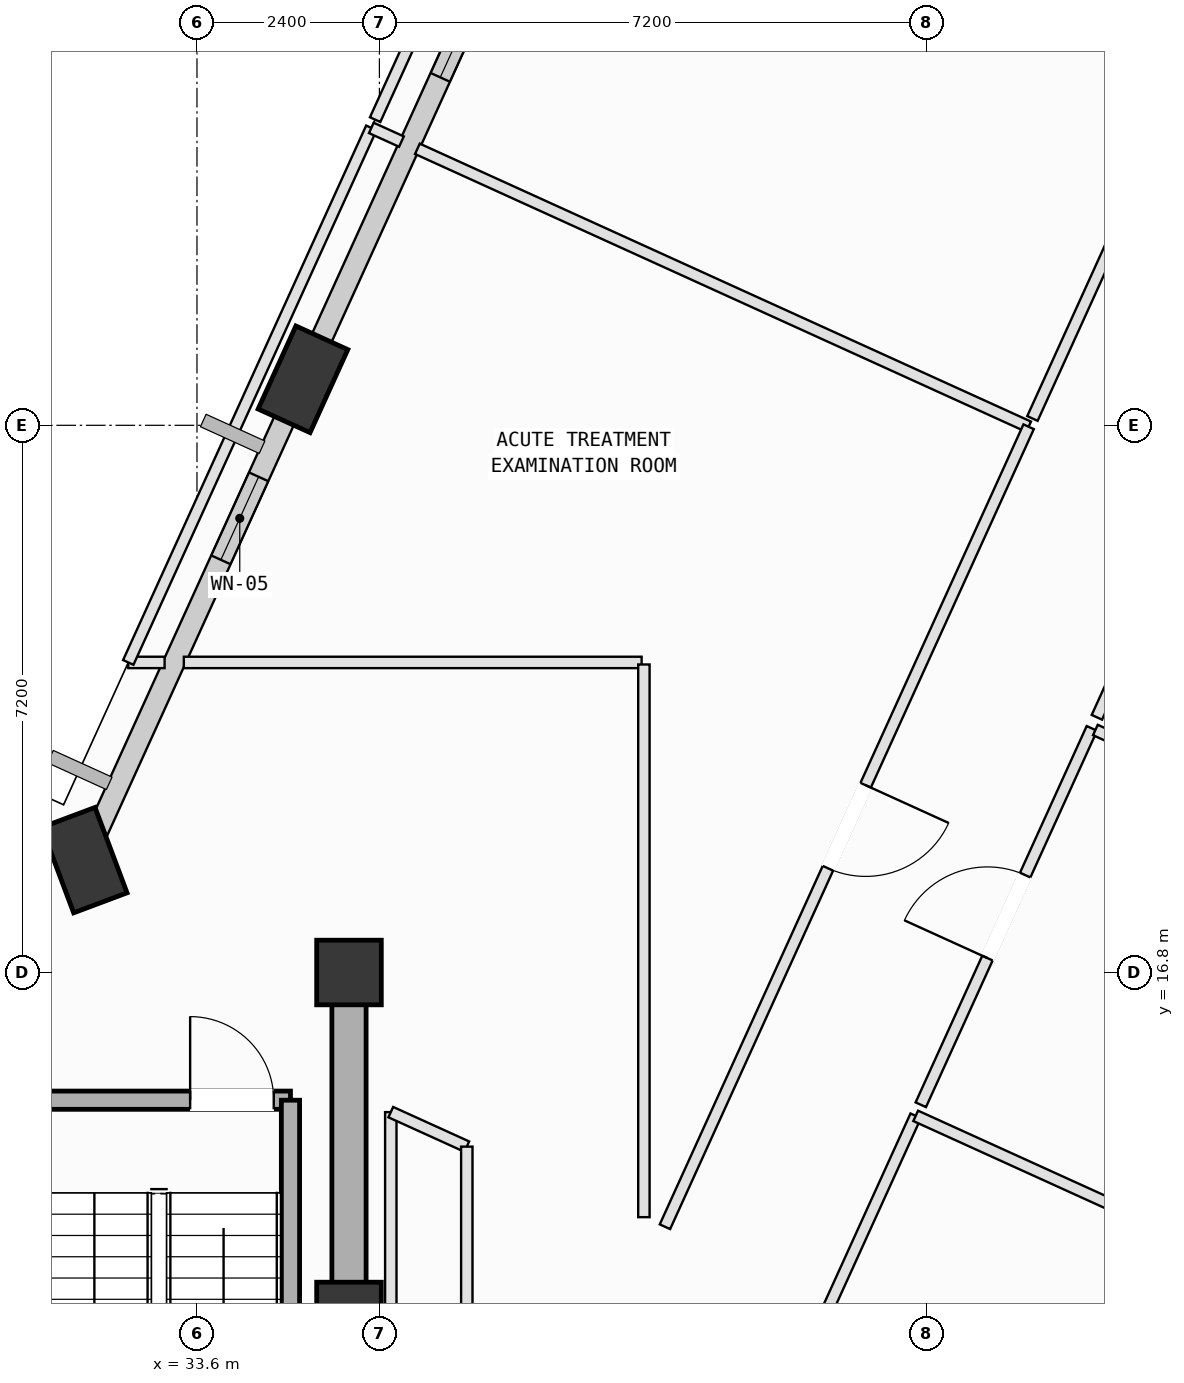
"""IFC4 building model, lengths in metres.
Left out: names, types, materials, properties, quantities, classifications, styles, units other than length and angle.
Written with IfcOpenShell. Run it as: python <this file> out.ifc"""

import sys

from ifc_helpers import new_model, si_unit, direction, frame, frame_2d, origin, origin_2d, place, context, subcontext, project, spatial, rectangle, extrude, element, fill, save


model = new_model("IFC4")
c1 = context("Model", 3, precision=1e-05, world=origin(), true_north=direction((0.0, 1.0)))
c2 = subcontext(c1, "Body", "Model", "MODEL_VIEW")
j1 = project(units=[si_unit("LENGTHUNIT", "METRE"), si_unit("PLANEANGLEUNIT", "RADIAN")], contexts=[c1])
p1 = place(None, origin())
s1 = spatial("IfcSite", under=j1, at=p1, CompositionType="ELEMENT")
p2 = place(p1, origin())
s2 = spatial("IfcBuilding", under=s1, at=p2, CompositionType="ELEMENT")
p3 = place(p2, frame((0.0, 0.0, 304.6)))
s3 = spatial("IfcBuildingStorey", under=s2, at=p3, CompositionType="ELEMENT", Elevation=304.6)
for number, where, z_axis, x_axis in (
    (1, (35.6, 12.3, 0.0), (0.0, 0.0, 1.0), (1.0, 0.0, 0.0)),
    (2, (35.6, 16.8, 0.0), (0.0, 0.0, 1.0), (1.0, 0.0, 0.0)),
):
    element("IfcColumn", number, at=place(p3, frame(where, z_axis=z_axis, x_axis=x_axis)), inside=s3, PredefinedType="COLUMN", context=c2, shape_type="SweptSolid", body=[
        extrude(rectangle(XDim=0.85, YDim=0.85, at=origin_2d()), origin(), (0.0, 0.0, 1.0), 4.0),
    ])
p4 = place(p3, frame((34.994, 24.605, 0.002), z_axis=(0.000795093642, 0.005749138642, 0.999983157474), x_axis=(-0.534703352063, -0.84502331988, 0.005283384443)))
e3 = element("IfcColumn", 3, at=p4, inside=s3, PredefinedType="COLUMN", context=c2, shape_type="SweptSolid", body=[
    extrude(rectangle(XDim=1.2, YDim=0.75, at=origin_2d()), origin(), (0.0, 0.0, 1.0), 3.992),
])
p5 = place(p3, frame((32.118, 18.279, 0.002), z_axis=(0.027064759156, -0.005891648252, 0.999616320041), x_axis=(-0.989252590347, -0.143898000097, 0.02593603784)))
e4 = element("IfcColumn", 4, at=p5, inside=s3, PredefinedType="COLUMN", context=c2, shape_type="SweptSolid", body=[
    extrude(rectangle(XDim=1.2, YDim=0.75, at=origin_2d()), origin(), (0.0, 0.0, 1.0), 3.978),
])
p6 = place(p3, frame((35.164, 24.977, 0.0), z_axis=(0.0, 0.0, 1.0), x_axis=(0.413860341101, 0.910340385825, 0.0)))
e5 = element("IfcWall", 5, at=p6, inside=s3, PredefinedType="SOLIDWALL", context=c2, shape_type="SweptSolid", body=[
    extrude(rectangle(XDim=6.409, YDim=0.28, at=frame_2d((3.205, 0.0))), origin(), (0.0, 0.0, 1.0), 3.265),
])
p7 = place(p6, frame((3.956, 0.0, 0.75)))
e6 = element("IfcOpeningElement", 6, at=p7, cuts=e5, PredefinedType="OPENING", context=c2, shape_type="SweptSolid", body=[
    extrude(rectangle(XDim=1.8, YDim=2.05, at=frame_2d((0.9, 1.025))), frame((0.0, 0.15, 0.0), z_axis=(0.0, -1.0, 0.0), x_axis=(1.0, 0.0, 0.0)), (0.0, 0.0, 1.0), 0.3),
])
p8 = place(p3, frame((32.286, 18.648, 0.0), z_axis=(0.0, 0.0, 1.0), x_axis=(0.413925403212, 0.910310804383, 0.0)))
e7 = element("IfcWall", 7, at=p8, inside=s3, PredefinedType="SOLIDWALL", context=c2, shape_type="SweptSolid", body=[
    extrude(rectangle(XDim=6.158, YDim=0.28, at=frame_2d((3.079, 0.0))), origin(), (0.0, 0.0, 1.0), 3.265),
])
p9 = place(p8, frame((3.935, 0.0, 0.75)))
e8 = element("IfcOpeningElement", 8, at=p9, cuts=e7, PredefinedType="OPENING", context=c2, shape_type="SweptSolid", body=[
    extrude(rectangle(XDim=1.2, YDim=1.75, at=frame_2d((0.6, 0.875))), frame((0.0, 0.15, 0.0), z_axis=(0.0, -1.0, 0.0), x_axis=(1.0, 0.0, 0.0)), (0.0, 0.0, 1.0), 0.3),
])
p10 = place(p3, frame((25.471, 21.301, 0.0), z_axis=(0.0, 0.0, 1.0), x_axis=(0.910323213303, -0.413898112247, 0.0)))
e9 = element("IfcWall", 9, at=p10, inside=s3, PredefinedType="SOLIDWALL", context=c2, shape_type="SweptSolid", body=[
    extrude(rectangle(XDim=6.958, YDim=0.28, at=frame_2d((3.479, 0.0))), origin(), (0.0, 0.0, 1.0), 2.765),
])
p11 = place(p3, frame((31.37, 15.12, 0.0), z_axis=(0.0, 0.0, 1.0), x_axis=(1.0, 0.0, 0.0)))
e10 = element("IfcWall", 10, at=p11, inside=s3, PredefinedType="SOLIDWALL", context=c2, shape_type="SweptSolid", body=[
    extrude(rectangle(XDim=3.46, YDim=0.24, at=frame_2d((1.73, 0.0))), origin(), (0.0, 0.0, 1.0), 3.78),
])
p12 = place(p11, frame((2.14, 0.0, 0.0)))
e11 = element("IfcOpeningElement", 11, at=p12, cuts=e10, PredefinedType="OPENING", context=c2, shape_type="SweptSolid", body=[
    extrude(rectangle(XDim=1.1, YDim=2.15, at=frame_2d((0.55, 1.075))), frame((0.0, 0.13, 0.0), z_axis=(0.0, -1.0, 0.0), x_axis=(1.0, 0.0, 0.0)), (0.0, 0.0, 1.0), 0.26),
])
p13 = place(p3, frame((34.83, 15.12, 0.0), z_axis=(0.0, 0.0, 1.0), x_axis=(0.0, -1.0, 0.0)))
e12 = element("IfcWall", 12, at=p13, inside=s3, PredefinedType="SOLIDWALL", context=c2, shape_type="SweptSolid", body=[
    extrude(rectangle(XDim=7.095, YDim=0.24, at=frame_2d((3.548, 0.0))), origin(), (0.0, 0.0, 1.0), 3.78),
])
p14 = place(p3, frame((35.6, 7.8, 0.0), z_axis=(0.0, 0.0, 1.0), x_axis=(0.0, 1.0, 0.0)))
e13 = element("IfcWall", 13, at=p14, inside=s3, PredefinedType="SHEAR", context=c2, shape_type="SweptSolid", body=[
    extrude(rectangle(XDim=9.0, YDim=0.45, at=frame_2d((4.5, 0.0))), origin(), (0.0, 0.0, 1.0), 3.78),
])
p15 = place(p3, frame((39.646, 7.413, 0.0), z_axis=(0.0, 0.0, 1.0), x_axis=(0.413840894574, 0.910349226384, 0.0)))
e14 = element("IfcWall", 14, at=p15, inside=s3, PredefinedType="PARTITIONING", context=c2, shape_type="SweptSolid", body=[
    extrude(rectangle(XDim=8.24, YDim=0.15, at=frame_2d((4.12, 0.0))), origin(), (0.0, 0.0, 1.0), 3.78),
])
p16 = place(p15, frame((3.52, 0.0, 0.0)))
e15 = element("IfcOpeningElement", 15, at=p16, cuts=e14, PredefinedType="OPENING", context=c2, shape_type="SweptSolid", body=[
    extrude(rectangle(XDim=1.2, YDim=2.15, at=frame_2d((0.6, 1.075))), frame((0.0, 0.085, 0.0), z_axis=(0.0, -1.0, 0.0), x_axis=(1.0, 0.0, 0.0)), (0.0, 0.0, 1.0), 0.17),
])
p17 = place(p3, frame((43.056, 14.914, 0.0), z_axis=(0.0, 0.0, 1.0), x_axis=(0.91037002219, -0.413795145813, 0.0)))
e16 = element("IfcWall", 16, at=p17, inside=s3, PredefinedType="PARTITIONING", context=c2, shape_type="SweptSolid", body=[
    extrude(rectangle(XDim=9.435, YDim=0.15, at=frame_2d((4.717, 0.0))), origin(), (0.0, 0.0, 1.0), 3.78),
])
p18 = place(p3, frame((43.123, 15.06, 0.0), z_axis=(0.0, 0.0, 1.0), x_axis=(0.413819852152, 0.910358791887, 0.0)))
e17 = element("IfcWall", 17, at=p18, inside=s3, PredefinedType="PARTITIONING", context=c2, shape_type="SweptSolid", body=[
    extrude(rectangle(XDim=5.439, YDim=0.15, at=frame_2d((2.72, 0.0))), origin(), (0.0, 0.0, 1.0), 3.78),
])
p19 = place(p18, frame((2.12, 0.0, 0.0)))
e18 = element("IfcOpeningElement", 18, at=p19, cuts=e17, PredefinedType="OPENING", context=c2, shape_type="SweptSolid", body=[
    extrude(rectangle(XDim=1.2, YDim=2.15, at=frame_2d((0.6, 1.075))), frame((0.0, 0.085, 0.0), z_axis=(0.0, -1.0, 0.0), x_axis=(1.0, 0.0, 0.0)), (0.0, 0.0, 1.0), 0.17),
])
p20 = place(p3, frame((45.42, 19.991, 0.0), z_axis=(0.0, 0.0, 1.0), x_axis=(0.910331727625, -0.413879385425, 0.0)))
e19 = element("IfcWall", 19, at=p20, inside=s3, PredefinedType="PARTITIONING", context=c2, shape_type="SweptSolid", body=[
    extrude(rectangle(XDim=9.385, YDim=0.15, at=frame_2d((4.692, 0.0))), origin(), (0.0, 0.0, 1.0), 3.78),
])
p21 = place(p3, frame((45.44, 20.158, 0.0), z_axis=(0.0, 0.0, 1.0), x_axis=(0.413963660089, 0.910293407713, 0.0)))
e20 = element("IfcWall", 20, at=p21, inside=s3, PredefinedType="PARTITIONING", context=c2, shape_type="SweptSolid", body=[
    extrude(rectangle(XDim=8.24, YDim=0.15, at=frame_2d((4.12, 0.0))), origin(), (0.0, 0.0, 1.0), 3.415),
])
p22 = place(p21, frame((3.52, 0.0, 0.0)))
e21 = element("IfcOpeningElement", 21, at=p22, cuts=e20, PredefinedType="OPENING", context=c2, shape_type="SweptSolid", body=[
    extrude(rectangle(XDim=1.2, YDim=2.15, at=frame_2d((0.6, 1.075))), frame((0.0, 0.085, 0.0), z_axis=(0.0, -1.0, 0.0), x_axis=(1.0, 0.0, 0.0)), (0.0, 0.0, 1.0), 0.17),
])
p23 = place(p3, frame((36.15, 7.5, 0.0), z_axis=(0.0, 0.0, 1.0), x_axis=(0.0, 1.0, 0.0)))
e22 = element("IfcWall", 22, at=p23, inside=s3, PredefinedType="PARTITIONING", context=c2, shape_type="SweptSolid", body=[
    extrude(rectangle(XDim=7.463, YDim=0.15, at=frame_2d((3.731, 0.0))), origin(), (0.0, 0.0, 1.0), 3.78),
])
p24 = place(p3, frame((36.15, 14.963, 0.0), z_axis=(0.0, 0.0, 1.0), x_axis=(0.910602348761, -0.413283634362, 0.0)))
e23 = element("IfcWall", 23, at=p24, inside=s3, PredefinedType="PARTITIONING", context=c2, shape_type="SweptSolid", body=[
    extrude(rectangle(XDim=1.098, YDim=0.15, at=frame_2d((0.549, 0.0))), origin(), (0.0, 0.0, 1.0), 3.78),
])
p25 = place(p3, frame((37.15, 14.509, 0.0), z_axis=(0.0, 0.0, 1.0), x_axis=(0.0, -1.0, 0.0)))
e24 = element("IfcWall", 24, at=p25, inside=s3, PredefinedType="PARTITIONING", context=c2, shape_type="SweptSolid", body=[
    extrude(rectangle(XDim=6.786, YDim=0.15, at=frame_2d((3.393, 0.0))), origin(), (0.0, 0.0, 1.0), 3.78),
])
p26 = place(p3, frame((39.45, 20.88, 0.0), z_axis=(0.0, 0.0, 1.0), x_axis=(-1.0, 0.0, 0.0)))
e25 = element("IfcWall", 25, at=p26, inside=s3, PredefinedType="PARTITIONING", context=c2, shape_type="SweptSolid", body=[
    extrude(rectangle(XDim=6.023, YDim=0.15, at=frame_2d((3.011, 0.0))), origin(), (0.0, 0.0, 1.0), 3.78),
])
p27 = place(p3, frame((33.174, 20.88, 0.0), z_axis=(0.0, 0.0, 1.0), x_axis=(-1.0, 0.0, 0.0)))
e26 = element("IfcWall", 26, at=p27, inside=s3, PredefinedType="PARTITIONING", context=c2, shape_type="SweptSolid", body=[
    extrude(rectangle(XDim=0.478, YDim=0.15, at=frame_2d((0.239, 0.0))), origin(), (0.0, 0.0, 1.0), 3.78),
])
p28 = place(p3, frame((32.696, 20.88, 0.0), z_axis=(0.0, 0.0, 1.0), x_axis=(0.413919598697, 0.910313443718, 0.0)))
e27 = element("IfcWall", 27, at=p28, inside=s3, PredefinedType="PARTITIONING", context=c2, shape_type="SweptSolid", body=[
    extrude(rectangle(XDim=7.726, YDim=0.15, at=frame_2d((3.863, 0.0))), origin(), (0.0, 0.0, 1.0), 3.78),
])
p29 = place(p3, frame((35.894, 27.913, 0.0), z_axis=(0.0, 0.0, 1.0), x_axis=(0.910212670279, -0.414141153308, 0.0)))
e28 = element("IfcWall", 28, at=p29, inside=s3, PredefinedType="PARTITIONING", context=c2, shape_type="SweptSolid", body=[
    extrude(rectangle(XDim=0.435, YDim=0.15, at=frame_2d((0.218, 0.0))), origin(), (0.0, 0.0, 1.0), 3.78),
])
p30 = place(p3, frame((36.5, 27.638, 0.0), z_axis=(0.0, 0.0, 1.0), x_axis=(0.910301163937, -0.413946603965, 0.0)))
e29 = element("IfcWall", 29, at=p30, inside=s3, PredefinedType="PARTITIONING", context=c2, shape_type="SweptSolid", body=[
    extrude(rectangle(XDim=8.834, YDim=0.15, at=frame_2d((4.417, 0.0))), origin(), (0.0, 0.0, 1.0), 3.78),
])
p31 = place(p3, frame((44.542, 23.981, 0.0), z_axis=(0.0, 0.0, 1.0), x_axis=(-0.413833170361, -0.910352737739, 0.0)))
e30 = element("IfcWall", 30, at=p31, inside=s3, PredefinedType="PARTITIONING", context=c2, shape_type="SweptSolid", body=[
    extrude(rectangle(XDim=11.562, YDim=0.15, at=frame_2d((5.781, 0.0))), origin(), (0.0, 0.0, 1.0), 3.78),
])
p32 = place(p31, frame((5.181, 0.0, 0.0)))
e31 = element("IfcOpeningElement", 31, at=p32, cuts=e30, PredefinedType="OPENING", context=c2, shape_type="SweptSolid", body=[
    extrude(rectangle(XDim=1.2, YDim=2.15, at=frame_2d((0.6, 1.075))), frame((0.0, 0.085, 0.0), z_axis=(0.0, -1.0, 0.0), x_axis=(1.0, 0.0, 0.0)), (0.0, 0.0, 1.0), 0.17),
])
p33 = place(p3, frame((39.48, 13.581, 0.0), z_axis=(0.0, 0.0, 1.0), x_axis=(0.0, 1.0, 0.0)))
e32 = element("IfcWall", 32, at=p33, inside=s3, PredefinedType="PARTITIONING", context=c2, shape_type="SweptSolid", body=[
    extrude(rectangle(XDim=7.272, YDim=0.15, at=frame_2d((3.636, 0.0))), origin(), (0.0, 0.0, 1.0), 3.78),
])
p34 = place(p3, frame((47.671, 30.862, 0.0), z_axis=(0.0, 0.0, 1.0), x_axis=(-0.41387959528, -0.910331632215, 0.0)))
e33 = element("IfcWall", 33, at=p34, inside=s3, PredefinedType="PARTITIONING", context=c2, shape_type="SweptSolid", body=[
    extrude(rectangle(XDim=7.439, YDim=0.15, at=frame_2d((3.719, 0.0))), origin(), (0.0, 0.0, 1.0), 3.78),
])
p35 = place(p34, frame((3.12, 0.0, 0.0)))
e34 = element("IfcOpeningElement", 34, at=p35, cuts=e33, PredefinedType="OPENING", context=c2, shape_type="SweptSolid", body=[
    extrude(rectangle(XDim=1.2, YDim=2.15, at=frame_2d((0.6, 1.075))), frame((0.0, 0.085, 0.0), z_axis=(0.0, -1.0, 0.0), x_axis=(1.0, 0.0, 0.0)), (0.0, 0.0, 1.0), 0.17),
])
p36 = place(p3, frame((35.944, 28.022, 0.0), z_axis=(0.0, 0.0, 1.0), x_axis=(0.41387959528, 0.910331632215, 0.0)))
e35 = element("IfcWall", 35, at=p36, inside=s3, PredefinedType="PARTITIONING", context=c2, shape_type="SweptSolid", body=[
    extrude(rectangle(XDim=7.439, YDim=0.15, at=frame_2d((3.719, 0.0))), origin(), (0.0, 0.0, 1.0), 3.265),
])
p37 = place(p7, origin())
e36 = element("IfcWindow", 36, at=p37, inside=s3, PartitioningType="SINGLE_PANEL", PredefinedType="WINDOW", context=c2, shape_type="SweptSolid", body=[
    extrude(rectangle(XDim=1.8, YDim=2.05, at=frame_2d((0.9, 1.025))), frame((0.0, 0.03, 0.0), z_axis=(0.0, -1.0, 0.0), x_axis=(1.0, 0.0, 0.0)), (0.0, 0.0, 1.0), 0.06),
])
fill(e6, e36)
p38 = place(p9, origin())
e37 = element("IfcWindow", 37, at=p38, inside=s3, PartitioningType="SINGLE_PANEL", PredefinedType="WINDOW", context=c2, shape_type="SweptSolid", body=[
    extrude(rectangle(XDim=1.2, YDim=1.75, at=frame_2d((0.6, 0.875))), frame((0.0, 0.03, 0.0), z_axis=(0.0, -1.0, 0.0), x_axis=(1.0, 0.0, 0.0)), (0.0, 0.0, 1.0), 0.06),
])
fill(e8, e37)
p39 = place(p12, origin())
e38 = element("IfcDoor", 38, at=p39, inside=s3, OperationType="SINGLE_SWING_LEFT", PredefinedType="DOOR", context=c2, shape_type="SweptSolid", body=[
    extrude(rectangle(XDim=1.1, YDim=2.15, at=frame_2d((0.55, 1.075))), frame((0.0, 0.025, 0.0), z_axis=(0.0, -1.0, 0.0), x_axis=(1.0, 0.0, 0.0)), (0.0, 0.0, 1.0), 0.05),
])
fill(e11, e38)
p40 = place(p19, origin())
e39 = element("IfcDoor", 39, at=p40, inside=s3, OperationType="SINGLE_SWING_LEFT", PredefinedType="DOOR", context=c2, shape_type="SweptSolid", body=[
    extrude(rectangle(XDim=1.2, YDim=2.15, at=frame_2d((0.6, 1.075))), frame((0.0, 0.025, 0.0), z_axis=(0.0, -1.0, 0.0), x_axis=(1.0, 0.0, 0.0)), (0.0, 0.0, 1.0), 0.05),
])
fill(e18, e39)
p41 = place(p32, origin())
e40 = element("IfcDoor", 40, at=p41, inside=s3, OperationType="SINGLE_SWING_LEFT", PredefinedType="DOOR", context=c2, shape_type="SweptSolid", body=[
    extrude(rectangle(XDim=1.2, YDim=2.15, at=frame_2d((0.6, 1.075))), frame((0.0, 0.025, 0.0), z_axis=(0.0, -1.0, 0.0), x_axis=(1.0, 0.0, 0.0)), (0.0, 0.0, 1.0), 0.05),
])
fill(e31, e40)
save(model, sys.argv[1])
